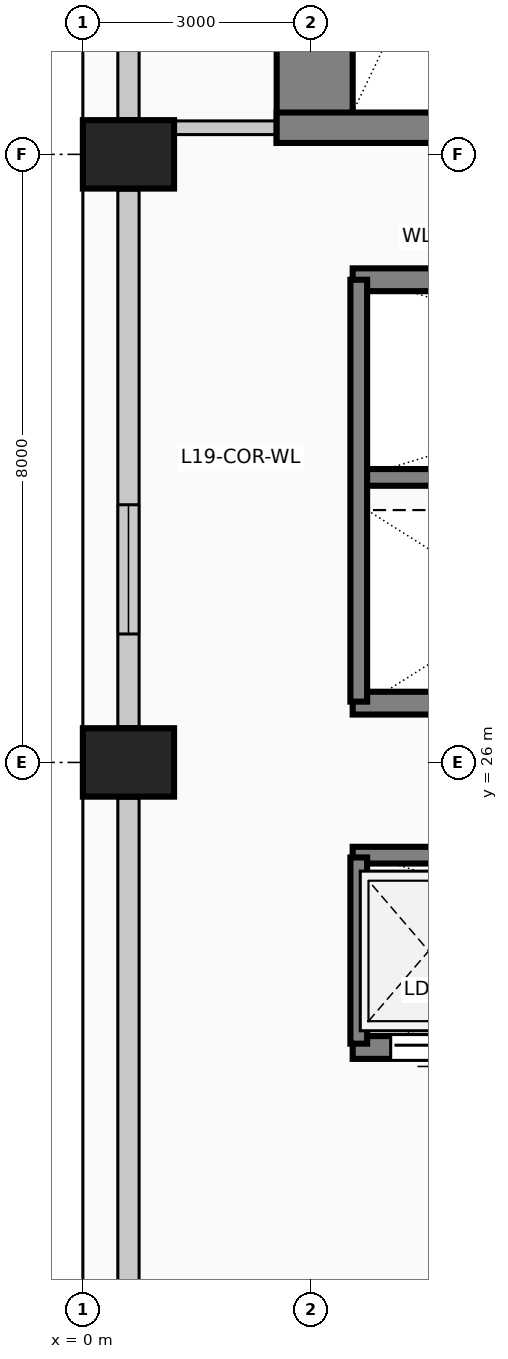
"""IFC4 building model, lengths in metres.
Left out: names, types, materials, properties, quantities, classifications, styles, units other than length and angle.
Written with IfcOpenShell. Run it as: python <this file> out.ifc"""

import sys

from ifc_helpers import new_model, si_unit, direction, frame, frame_2d, origin, origin_2d, place, context, subcontext, project, spatial, rectangle, extrude, element, fill, save


model = new_model("IFC4")
c1 = context("Model", 3, precision=1e-05, world=origin(), true_north=direction((0.0, 1.0)))
c2 = subcontext(c1, "Body", "Model", "MODEL_VIEW")
j1 = project(units=[si_unit("LENGTHUNIT", "METRE"), si_unit("PLANEANGLEUNIT", "RADIAN")], contexts=[c1])
p1 = place(None, origin())
s1 = spatial("IfcSite", under=j1, at=p1, CompositionType="ELEMENT")
p2 = place(p1, origin())
s2 = spatial("IfcBuilding", under=s1, at=p2, CompositionType="ELEMENT")
p3 = place(p2, frame((0.0, 0.0, 78.6)))
s3 = spatial("IfcBuildingStorey", under=s2, at=p3, CompositionType="ELEMENT", Elevation=78.6)
p4 = place(p3, frame((3.05, 34.15, 0.0), z_axis=(0.0, 0.0, 1.0), x_axis=(0.0, 1.0, 0.0)))
e1 = element("IfcWall", 1, at=p4, inside=s3, PredefinedType="SHEAR", context=c2, shape_type="SweptSolid", body=[
    extrude(rectangle(XDim=9.28, YDim=1.0, at=frame_2d((4.64, 0.0))), origin(), (0.0, 0.0, 1.0), 4.0),
])
p5 = place(p3, frame((2.55, 34.35, 0.0), z_axis=(0.0, 0.0, 1.0), x_axis=(1.0, 0.0, 0.0)))
e2 = element("IfcWall", 2, at=p5, inside=s3, PredefinedType="SHEAR", context=c2, shape_type="SweptSolid", body=[
    extrude(rectangle(XDim=5.16, YDim=0.4, at=frame_2d((2.58, 0.0))), origin(), (0.0, 0.0, 1.0), 4.0),
])
p6 = place(p5, frame((2.4, 0.0, 0.0)))
e3 = element("IfcOpeningElement", 3, at=p6, cuts=e2, PredefinedType="OPENING", context=c2, shape_type="SweptSolid", body=[
    extrude(rectangle(XDim=1.15, YDim=2.2, at=frame_2d((0.575, 1.1))), frame((0.0, 0.21, 0.0), z_axis=(0.0, -1.0, 0.0), x_axis=(1.0, 0.0, 0.0)), (0.0, 0.0, 1.0), 0.42),
])
for number, where, z_axis, x_axis in (
    (4, (0.6, 26.0, 0.0), (0.0, 0.0, 1.0), (0.0, 1.0, 0.0)),
    (5, (0.6, 34.0, 0.0), (0.0, 0.0, 1.0), (0.0, 1.0, 0.0)),
):
    element("IfcColumn", number, at=place(p3, frame(where, z_axis=z_axis, x_axis=x_axis)), inside=s3, PredefinedType="COLUMN", context=c2, shape_type="SweptSolid", body=[
        extrude(rectangle(XDim=0.9, YDim=1.2, at=origin_2d()), origin(), (0.0, 0.0, 1.0), 4.0),
    ])
p7 = place(p3, frame((0.6, 18.47, 0.0), z_axis=(0.0, 0.0, 1.0), x_axis=(0.0, 1.0, 0.0)))
e6 = element("IfcWall", 6, at=p7, inside=s3, PredefinedType="SOLIDWALL", context=c2, shape_type="SweptSolid", body=[
    extrude(rectangle(XDim=7.06, YDim=0.28, at=frame_2d((3.53, 0.0))), origin(), (0.0, 0.0, 1.0), 2.81),
])
p8 = place(p3, frame((0.6, 26.47, 0.0), z_axis=(0.0, 0.0, 1.0), x_axis=(0.0, 1.0, 0.0)))
e7 = element("IfcWall", 7, at=p8, inside=s3, PredefinedType="SOLIDWALL", context=c2, shape_type="SweptSolid", body=[
    extrude(rectangle(XDim=7.06, YDim=0.28, at=frame_2d((3.53, 0.0))), origin(), (0.0, 0.0, 1.0), 2.81),
])
p9 = place(p8, frame((1.22, 0.0, 0.5)))
e8 = element("IfcOpeningElement", 8, at=p9, cuts=e7, PredefinedType="OPENING", context=c2, shape_type="SweptSolid", body=[
    extrude(rectangle(XDim=1.7, YDim=1.95, at=frame_2d((0.85, 0.975))), frame((0.0, 0.15, 0.0), z_axis=(0.0, -1.0, 0.0), x_axis=(1.0, 0.0, 0.0)), (0.0, 0.0, 1.0), 0.3),
])
p10 = place(p3, frame((0.6, 34.47, 0.0), z_axis=(0.0, 0.0, 1.0), x_axis=(0.0, 1.0, 0.0)))
e9 = element("IfcWall", 9, at=p10, inside=s3, PredefinedType="SOLIDWALL", context=c2, shape_type="SweptSolid", body=[
    extrude(rectangle(XDim=7.46, YDim=0.28, at=frame_2d((3.73, 0.0))), origin(), (0.0, 0.0, 1.0), 2.81),
])
p11 = place(p3, frame((5.65, 22.25, 0.0), z_axis=(0.0, 0.0, 1.0), x_axis=(-1.0, 0.0, 0.0)))
e10 = element("IfcWall", 10, at=p11, inside=s3, PredefinedType="SOLIDWALL", context=c2, shape_type="SweptSolid", body=[
    extrude(rectangle(XDim=2.1, YDim=0.3, at=frame_2d((1.05, 0.0))), origin(), (0.0, 0.0, 1.0), 4.0),
])
p12 = place(p11, frame((0.5, 0.0, 0.0)))
e11 = element("IfcOpeningElement", 11, at=p12, cuts=e10, PredefinedType="OPENING", context=c2, shape_type="SweptSolid", body=[
    extrude(rectangle(XDim=1.1, YDim=2.2, at=frame_2d((0.55, 1.1))), frame((0.0, 0.16, 0.0), z_axis=(0.0, -1.0, 0.0), x_axis=(1.0, 0.0, 0.0)), (0.0, 0.0, 1.0), 0.32),
])
for number, where, z_axis, x_axis in (
    (12, (3.55, 32.35, 0.0), (0.0, 0.0, 1.0), (1.0, 0.0, 0.0)),
    (13, (5.65, 26.78, 0.0), (0.0, 0.0, 1.0), (-1.0, 0.0, 0.0)),
):
    element("IfcWall", number, at=place(p3, frame(where, z_axis=z_axis, x_axis=x_axis)), inside=s3, PredefinedType="SOLIDWALL", context=c2, shape_type="SweptSolid", body=[
        extrude(rectangle(XDim=2.1, YDim=0.3, at=frame_2d((1.05, 0.0))), origin(), (0.0, 0.0, 1.0), 4.0),
    ])
p13 = place(p3, frame((3.55, 29.75, 0.0), z_axis=(0.0, 0.0, 1.0), x_axis=(1.0, 0.0, 0.0)))
e14 = element("IfcWall", 14, at=p13, inside=s3, PredefinedType="SOLIDWALL", context=c2, shape_type="SweptSolid", body=[
    extrude(rectangle(XDim=8.65, YDim=0.22, at=frame_2d((4.325, 0.0))), origin(), (0.0, 0.0, 1.0), 4.0),
])
p14 = place(p3, frame((3.63, 26.8, 0.0), z_axis=(0.0, 0.0, 1.0), x_axis=(0.0, 1.0, 0.0)))
e15 = element("IfcWall", 15, at=p14, inside=s3, PredefinedType="SOLIDWALL", context=c2, shape_type="SweptSolid", body=[
    extrude(rectangle(XDim=5.55, YDim=0.22, at=frame_2d((2.775, 0.0))), origin(), (0.0, 0.0, 1.0), 4.0),
])
p15 = place(p3, frame((3.55, 24.78, 0.0), z_axis=(0.0, 0.0, 1.0), x_axis=(1.0, 0.0, 0.0)))
e16 = element("IfcWall", 16, at=p15, inside=s3, PredefinedType="SOLIDWALL", context=c2, shape_type="SweptSolid", body=[
    extrude(rectangle(XDim=8.65, YDim=0.22, at=frame_2d((4.325, 0.0))), origin(), (0.0, 0.0, 1.0), 4.0),
])
p16 = place(p3, frame((3.63, 22.3, 0.0), z_axis=(0.0, 0.0, 1.0), x_axis=(0.0, 1.0, 0.0)))
e17 = element("IfcWall", 17, at=p16, inside=s3, PredefinedType="SOLIDWALL", context=c2, shape_type="SweptSolid", body=[
    extrude(rectangle(XDim=2.45, YDim=0.22, at=frame_2d((1.225, 0.0))), origin(), (0.0, 0.0, 1.0), 4.0),
])
p17 = place(p3, frame((1.2, 34.35, 0.0), z_axis=(0.0, 0.0, 1.0), x_axis=(1.0, 0.0, 0.0)))
e18 = element("IfcWall", 18, at=p17, inside=s3, PredefinedType="PARTITIONING", context=c2, shape_type="SweptSolid", body=[
    extrude(rectangle(XDim=1.35, YDim=0.18, at=frame_2d((0.675, 0.0))), origin(), (0.0, 0.0, 1.0), 3.66),
])
p18 = place(p9, origin())
e19 = element("IfcWindow", 19, at=p18, inside=s3, PartitioningType="SINGLE_PANEL", PredefinedType="WINDOW", context=c2, shape_type="SweptSolid", body=[
    extrude(rectangle(XDim=1.7, YDim=1.95, at=frame_2d((0.85, 0.975))), frame((0.0, 0.03, 0.0), z_axis=(0.0, -1.0, 0.0), x_axis=(1.0, 0.0, 0.0)), (0.0, 0.0, 1.0), 0.06),
])
fill(e8, e19)
p19 = place(p12, origin())
e20 = element("IfcDoor", 20, at=p19, inside=s3, OperationType="SLIDING_TO_LEFT", PredefinedType="DOOR", context=c2, shape_type="SweptSolid", body=[
    extrude(rectangle(XDim=1.1, YDim=2.2, at=frame_2d((0.55, 1.1))), frame((0.0, 0.025, 0.0), z_axis=(0.0, -1.0, 0.0), x_axis=(1.0, 0.0, 0.0)), (0.0, 0.0, 1.0), 0.05),
])
fill(e11, e20)
save(model, sys.argv[1])
